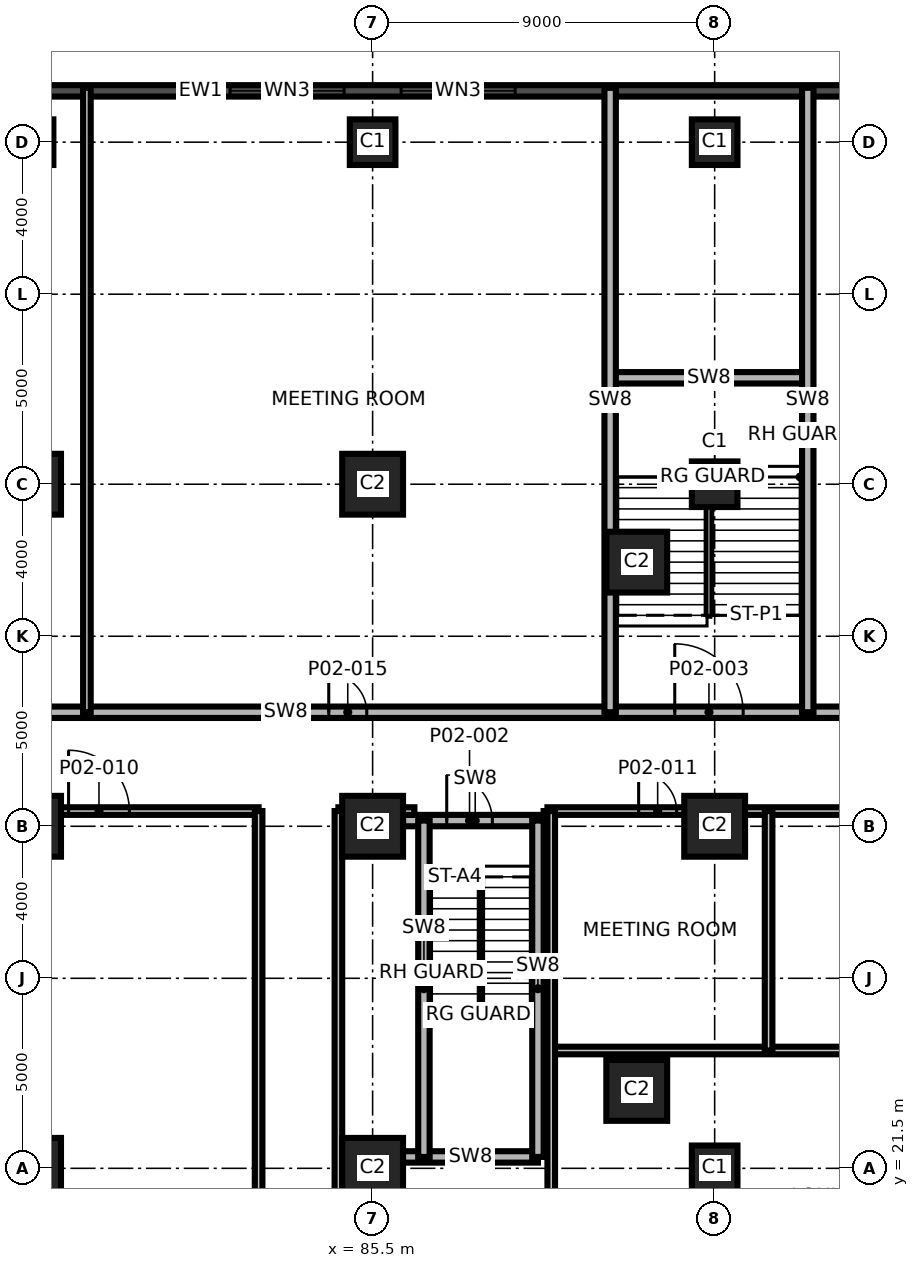
"""IFC4 building model, lengths in metres.
Left out: names, types, materials, properties, quantities, classifications, styles, units other than length and angle.
Written with IfcOpenShell. Run it as: python <this file> out.ifc"""

import sys

from ifc_helpers import new_model, si_unit, direction, frame, frame_2d, origin, origin_2d, place, context, subcontext, project, spatial, rectangle, extrude, element, fill, save


model = new_model("IFC4")
c1 = context("Model", 3, precision=1e-05, world=origin(), true_north=direction((0.0, 1.0)))
c2 = subcontext(c1, "Body", "Model", "MODEL_VIEW")
j1 = project(units=[si_unit("LENGTHUNIT", "METRE"), si_unit("PLANEANGLEUNIT", "RADIAN")], contexts=[c1])
p1 = place(None, origin())
s1 = spatial("IfcSite", under=j1, at=p1, CompositionType="ELEMENT")
p2 = place(p1, origin())
s2 = spatial("IfcBuilding", under=s1, at=p2, CompositionType="ELEMENT")
p3 = place(p2, frame((0.0, 0.0, 13.5)))
s3 = spatial("IfcBuildingStorey", under=s2, at=p3, CompositionType="ELEMENT", Elevation=13.5)
for number, where, z_axis, x_axis in (
    (1, (76.5, 21.5, 0.0), (0.0, 0.0, 1.0), (1.0, 0.0, 0.0)),
    (2, (85.5, 21.5, 0.0), (0.0, 0.0, 1.0), (1.0, 0.0, 0.0)),
):
    element("IfcColumn", number, at=place(p3, frame(where, z_axis=z_axis, x_axis=x_axis)), inside=s3, PredefinedType="COLUMN", context=c2, shape_type="SweptSolid", body=[
        extrude(rectangle(XDim=1.6, YDim=1.6, at=origin_2d()), origin(), (0.0, 0.0, 1.0), 5.0),
    ])
p4 = place(p3, frame((94.5, 21.5, 0.0), z_axis=(0.0, 0.0, 1.0), x_axis=(1.0, 0.0, 0.0)))
e3 = element("IfcColumn", 3, at=p4, inside=s3, PredefinedType="COLUMN", context=c2, shape_type="SweptSolid", body=[
    extrude(rectangle(XDim=1.2, YDim=1.2, at=origin_2d()), origin(), (0.0, 0.0, 1.0), 5.0),
])
for number, where, z_axis, x_axis in (
    (4, (76.5, 30.5, 0.0), (0.0, 0.0, 1.0), (1.0, 0.0, 0.0)),
    (5, (85.5, 30.5, 0.0), (0.0, 0.0, 1.0), (1.0, 0.0, 0.0)),
    (6, (94.5, 30.5, 0.0), (0.0, 0.0, 1.0), (1.0, 0.0, 0.0)),
    (7, (76.5, 39.5, 0.0), (0.0, 0.0, 1.0), (1.0, 0.0, 0.0)),
    (8, (85.5, 39.5, 0.0), (0.0, 0.0, 1.0), (1.0, 0.0, 0.0)),
):
    element("IfcColumn", number, at=place(p3, frame(where, z_axis=z_axis, x_axis=x_axis)), inside=s3, PredefinedType="COLUMN", context=c2, shape_type="SweptSolid", body=[
        extrude(rectangle(XDim=1.6, YDim=1.6, at=origin_2d()), origin(), (0.0, 0.0, 1.0), 5.0),
    ])
for number, where, z_axis, x_axis in (
    (9, (94.5, 39.5, 0.0), (0.0, 0.0, 1.0), (1.0, 0.0, 0.0)),
    (10, (76.5, 48.5, 0.0), (0.0, 0.0, 1.0), (1.0, 0.0, 0.0)),
    (11, (85.5, 48.5, 0.0), (0.0, 0.0, 1.0), (1.0, 0.0, 0.0)),
    (12, (94.5, 48.5, 0.0), (0.0, 0.0, 1.0), (1.0, 0.0, 0.0)),
):
    element("IfcColumn", number, at=place(p3, frame(where, z_axis=z_axis, x_axis=x_axis)), inside=s3, PredefinedType="COLUMN", context=c2, shape_type="SweptSolid", body=[
        extrude(rectangle(XDim=1.2, YDim=1.2, at=origin_2d()), origin(), (0.0, 0.0, 1.0), 5.0),
    ])
for number, where, z_axis, x_axis in (
    (13, (92.45, 23.55, 0.0), (0.0, 0.0, 1.0), (1.0, 0.0, 0.0)),
    (14, (92.45, 37.45, 0.0), (0.0, 0.0, 1.0), (1.0, 0.0, 0.0)),
):
    element("IfcColumn", number, at=place(p3, frame(where, z_axis=z_axis, x_axis=x_axis)), inside=s3, PredefinedType="COLUMN", context=c2, shape_type="SweptSolid", body=[
        extrude(rectangle(XDim=1.6, YDim=1.6, at=origin_2d()), origin(), (0.0, 0.0, 1.0), 5.0),
    ])
p5 = place(p3, frame((98.952, 49.85, 0.0), z_axis=(0.0, 0.0, 1.0), x_axis=(-1.0, 0.0, 0.0)))
e15 = element("IfcWall", 15, at=p5, inside=s3, PredefinedType="SOLIDWALL", context=c2, shape_type="SweptSolid", body=[
    extrude(rectangle(XDim=35.952, YDim=0.3, at=frame_2d((17.976, 0.0))), origin(), (0.0, 0.0, 1.0), 4.7),
])
p6 = place(p5, frame((9.702, 0.0, 0.9)))
e16 = element("IfcOpeningElement", 16, at=p6, cuts=e15, PredefinedType="OPENING", context=c2, shape_type="SweptSolid", body=[
    extrude(rectangle(XDim=3.0, YDim=2.4, at=frame_2d((1.5, 1.2))), frame((0.0, 0.16, 0.0), z_axis=(0.0, -1.0, 0.0), x_axis=(1.0, 0.0, 0.0)), (0.0, 0.0, 1.0), 0.32),
])
p7 = place(p5, frame((14.202, 0.0, 0.9)))
e17 = element("IfcOpeningElement", 17, at=p7, cuts=e15, PredefinedType="OPENING", context=c2, shape_type="SweptSolid", body=[
    extrude(rectangle(XDim=3.0, YDim=2.4, at=frame_2d((1.5, 1.2))), frame((0.0, 0.16, 0.0), z_axis=(0.0, -1.0, 0.0), x_axis=(1.0, 0.0, 0.0)), (0.0, 0.0, 1.0), 0.32),
])
p8 = place(p5, frame((23.202, 0.0, 0.9)))
e18 = element("IfcOpeningElement", 18, at=p8, cuts=e15, PredefinedType="OPENING", context=c2, shape_type="SweptSolid", body=[
    extrude(rectangle(XDim=3.0, YDim=2.4, at=frame_2d((1.5, 1.2))), frame((0.0, 0.16, 0.0), z_axis=(0.0, -1.0, 0.0), x_axis=(1.0, 0.0, 0.0)), (0.0, 0.0, 1.0), 0.32),
])
p9 = place(p5, frame((27.702, 0.0, 0.9)))
e19 = element("IfcOpeningElement", 19, at=p9, cuts=e15, PredefinedType="OPENING", context=c2, shape_type="SweptSolid", body=[
    extrude(rectangle(XDim=3.0, YDim=2.4, at=frame_2d((1.5, 1.2))), frame((0.0, 0.16, 0.0), z_axis=(0.0, -1.0, 0.0), x_axis=(1.0, 0.0, 0.0)), (0.0, 0.0, 1.0), 0.32),
])
p10 = place(p5, frame((32.226, 0.0, 0.9)))
e20 = element("IfcOpeningElement", 20, at=p10, cuts=e15, PredefinedType="OPENING", context=c2, shape_type="SweptSolid", body=[
    extrude(rectangle(XDim=3.0, YDim=2.4, at=frame_2d((1.5, 1.2))), frame((0.0, 0.16, 0.0), z_axis=(0.0, -1.0, 0.0), x_axis=(1.0, 0.0, 0.0)), (0.0, 0.0, 1.0), 0.32),
])
p11 = place(p3, frame((86.3, 21.8, 0.0), z_axis=(0.0, 0.0, 1.0), x_axis=(1.0, 0.0, 0.0)))
e21 = element("IfcWall", 21, at=p11, inside=s3, PredefinedType="SHEAR", context=c2, shape_type="SweptSolid", body=[
    extrude(rectangle(XDim=3.55, YDim=0.3, at=frame_2d((1.775, 0.0))), origin(), (0.0, 0.0, 1.0), 4.7),
])
p12 = place(p3, frame((90.2, 24.6, 0.0), z_axis=(0.0, 0.0, 1.0), x_axis=(1.0, 0.0, 0.0)))
e22 = element("IfcWall", 22, at=p12, inside=s3, PredefinedType="PARTITIONING", context=c2, shape_type="SweptSolid", body=[
    extrude(rectangle(XDim=14.73, YDim=0.2, at=frame_2d((7.365, 0.0))), origin(), (0.0, 0.0, 1.0), 4.7),
])
p13 = place(p12, frame((9.727, 0.0, 0.0)))
e23 = element("IfcOpeningElement", 23, at=p13, cuts=e22, PredefinedType="OPENING", context=c2, shape_type="SweptSolid", body=[
    extrude(rectangle(XDim=1.0, YDim=2.1, at=frame_2d((0.5, 1.05))), frame((0.0, 0.11, 0.0), z_axis=(0.0, -1.0, 0.0), x_axis=(1.0, 0.0, 0.0)), (0.0, 0.0, 1.0), 0.22),
])
p14 = place(p3, frame((86.3, 30.65, 0.0), z_axis=(0.0, 0.0, 1.0), x_axis=(1.0, 0.0, 0.0)))
e24 = element("IfcWall", 24, at=p14, inside=s3, PredefinedType="SHEAR", context=c2, shape_type="SweptSolid", body=[
    extrude(rectangle(XDim=3.8, YDim=0.3, at=frame_2d((1.9, 0.0))), origin(), (0.0, 0.0, 1.0), 4.7),
])
p15 = place(p14, frame((1.15, 0.0, 0.0)))
e25 = element("IfcOpeningElement", 25, at=p15, cuts=e24, PredefinedType="OPENING", context=c2, shape_type="SweptSolid", body=[
    extrude(rectangle(XDim=1.2, YDim=2.1, at=frame_2d((0.6, 1.05))), frame((0.0, 0.16, 0.0), z_axis=(0.0, -1.0, 0.0), x_axis=(1.0, 0.0, 0.0)), (0.0, 0.0, 1.0), 0.32),
])
p16 = place(p3, frame((58.97, 30.9, 0.0), z_axis=(0.0, 0.0, 1.0), x_axis=(1.0, 0.0, 0.0)))
e26 = element("IfcWall", 26, at=p16, inside=s3, PredefinedType="PARTITIONING", context=c2, shape_type="SweptSolid", body=[
    extrude(rectangle(XDim=23.53, YDim=0.2, at=frame_2d((11.765, 0.0))), origin(), (0.0, 0.0, 1.0), 4.7),
])
p17 = place(p16, frame((18.53, 0.0, 0.0)))
e27 = element("IfcOpeningElement", 27, at=p17, cuts=e26, PredefinedType="OPENING", context=c2, shape_type="SweptSolid", body=[
    extrude(rectangle(XDim=1.6, YDim=2.1, at=frame_2d((0.8, 1.05))), frame((0.0, 0.11, 0.0), z_axis=(0.0, -1.0, 0.0), x_axis=(1.0, 0.0, 0.0)), (0.0, 0.0, 1.0), 0.22),
])
p18 = place(p3, frame((84.6, 30.9, 0.0), z_axis=(0.0, 0.0, 1.0), x_axis=(1.0, 0.0, 0.0)))
e28 = element("IfcWall", 28, at=p18, inside=s3, PredefinedType="PARTITIONING", context=c2, shape_type="SweptSolid", body=[
    extrude(rectangle(XDim=2.0, YDim=0.2, at=frame_2d((1.0, 0.0))), origin(), (0.0, 0.0, 1.0), 4.7),
])
p19 = place(p3, frame((90.1, 30.9, 0.0), z_axis=(0.0, 0.0, 1.0), x_axis=(1.0, 0.0, 0.0)))
e29 = element("IfcWall", 29, at=p19, inside=s3, PredefinedType="PARTITIONING", context=c2, shape_type="SweptSolid", body=[
    extrude(rectangle(XDim=14.83, YDim=0.2, at=frame_2d((7.415, 0.0))), origin(), (0.0, 0.0, 1.0), 4.7),
])
p20 = place(p19, frame((2.4, 0.0, 0.0)))
e30 = element("IfcOpeningElement", 30, at=p20, cuts=e29, PredefinedType="OPENING", context=c2, shape_type="SweptSolid", body=[
    extrude(rectangle(XDim=1.0, YDim=2.1, at=frame_2d((0.5, 1.05))), frame((0.0, 0.11, 0.0), z_axis=(0.0, -1.0, 0.0), x_axis=(1.0, 0.0, 0.0)), (0.0, 0.0, 1.0), 0.22),
])
p21 = place(p19, frame((8.826, 0.0, 0.0)))
e31 = element("IfcOpeningElement", 31, at=p21, cuts=e29, PredefinedType="OPENING", context=c2, shape_type="SweptSolid", body=[
    extrude(rectangle(XDim=1.0, YDim=2.1, at=frame_2d((0.5, 1.05))), frame((0.0, 0.11, 0.0), z_axis=(0.0, -1.0, 0.0), x_axis=(1.0, 0.0, 0.0)), (0.0, 0.0, 1.0), 0.22),
])
p22 = place(p3, frame((61.5, 33.5, 0.0), z_axis=(0.0, 0.0, 1.0), x_axis=(1.0, 0.0, 0.0)))
e32 = element("IfcWall", 32, at=p22, inside=s3, PredefinedType="SHEAR", context=c2, shape_type="SweptSolid", body=[
    extrude(rectangle(XDim=43.43, YDim=0.3, at=frame_2d((21.715, 0.0))), origin(), (0.0, 0.0, 1.0), 4.7),
])
p23 = place(p22, frame((31.95, 0.0, 0.0)))
e33 = element("IfcOpeningElement", 33, at=p23, cuts=e32, PredefinedType="OPENING", context=c2, shape_type="SweptSolid", body=[
    extrude(rectangle(XDim=1.8, YDim=2.1, at=frame_2d((0.9, 1.05))), frame((0.0, 0.16, 0.0), z_axis=(0.0, -1.0, 0.0), x_axis=(1.0, 0.0, 0.0)), (0.0, 0.0, 1.0), 0.32),
])
p24 = place(p22, frame((2.068, 0.0, 0.0)))
e34 = element("IfcOpeningElement", 34, at=p24, cuts=e32, PredefinedType="OPENING", context=c2, shape_type="SweptSolid", body=[
    extrude(rectangle(XDim=1.0, YDim=2.1, at=frame_2d((0.5, 1.05))), frame((0.0, 0.16, 0.0), z_axis=(0.0, -1.0, 0.0), x_axis=(1.0, 0.0, 0.0)), (0.0, 0.0, 1.0), 0.32),
])
p25 = place(p22, frame((22.846, 0.0, 0.0)))
e35 = element("IfcOpeningElement", 35, at=p25, cuts=e32, PredefinedType="OPENING", context=c2, shape_type="SweptSolid", body=[
    extrude(rectangle(XDim=1.0, YDim=2.1, at=frame_2d((0.5, 1.05))), frame((0.0, 0.16, 0.0), z_axis=(0.0, -1.0, 0.0), x_axis=(1.0, 0.0, 0.0)), (0.0, 0.0, 1.0), 0.32),
])
p26 = place(p22, frame((37.945, 0.0, 0.0)))
e36 = element("IfcOpeningElement", 36, at=p26, cuts=e32, PredefinedType="OPENING", context=c2, shape_type="SweptSolid", body=[
    extrude(rectangle(XDim=1.0, YDim=2.1, at=frame_2d((0.5, 1.05))), frame((0.0, 0.16, 0.0), z_axis=(0.0, -1.0, 0.0), x_axis=(1.0, 0.0, 0.0)), (0.0, 0.0, 1.0), 0.32),
])
p27 = place(p3, frame((91.75, 42.3, 0.0), z_axis=(0.0, 0.0, 1.0), x_axis=(1.0, 0.0, 0.0)))
e37 = element("IfcWall", 37, at=p27, inside=s3, PredefinedType="SHEAR", context=c2, shape_type="SweptSolid", body=[
    extrude(rectangle(XDim=5.2, YDim=0.3, at=frame_2d((2.6, 0.0))), origin(), (0.0, 0.0, 1.0), 4.7),
])
p28 = place(p3, frame((77.982, 33.5, 0.0), z_axis=(0.0, 0.0, 1.0), x_axis=(0.0, 1.0, 0.0)))
e38 = element("IfcWall", 38, at=p28, inside=s3, PredefinedType="PARTITIONING", context=c2, shape_type="SweptSolid", body=[
    extrude(rectangle(XDim=16.43, YDim=0.2, at=frame_2d((8.215, 0.0))), origin(), (0.0, 0.0, 1.0), 4.7),
])
p29 = place(p3, frame((82.5, 11.07, 0.0), z_axis=(0.0, 0.0, 1.0), x_axis=(0.0, 1.0, 0.0)))
e39 = element("IfcWall", 39, at=p29, inside=s3, PredefinedType="PARTITIONING", context=c2, shape_type="SweptSolid", body=[
    extrude(rectangle(XDim=19.83, YDim=0.2, at=frame_2d((9.915, 0.0))), origin(), (0.0, 0.0, 1.0), 4.7),
])
p30 = place(p3, frame((84.6, 17.4, 0.0), z_axis=(0.0, 0.0, 1.0), x_axis=(0.0, 1.0, 0.0)))
e40 = element("IfcWall", 40, at=p30, inside=s3, PredefinedType="PARTITIONING", context=c2, shape_type="SweptSolid", body=[
    extrude(rectangle(XDim=13.5, YDim=0.2, at=frame_2d((6.75, 0.0))), origin(), (0.0, 0.0, 1.0), 4.7),
])
for number, where, z_axis, x_axis in (
    (41, (86.85, 21.8, 0.0), (0.0, 0.0, 1.0), (0.0, 1.0, 0.0)),
    (42, (89.85, 21.8, 0.0), (0.0, 0.0, 1.0), (0.0, 1.0, 0.0)),
):
    element("IfcWall", number, at=place(p3, frame(where, z_axis=z_axis, x_axis=x_axis)), inside=s3, PredefinedType="SHEAR", context=c2, shape_type="SweptSolid", body=[
        extrude(rectangle(XDim=8.85, YDim=0.3, at=frame_2d((4.425, 0.0))), origin(), (0.0, 0.0, 1.0), 4.7),
    ])
p31 = place(p3, frame((90.1, 30.65, 0.0), z_axis=(0.0, 0.0, 1.0), x_axis=(0.0, 1.0, 0.0)))
e43 = element("IfcWall", 43, at=p31, inside=s3, PredefinedType="PARTITIONING", context=c2, shape_type="SweptSolid", body=[
    extrude(rectangle(XDim=0.25, YDim=0.2, at=frame_2d((0.125, 0.0))), origin(), (0.0, 0.0, 1.0), 4.7),
])
p32 = place(p3, frame((90.2, 11.07, 0.0), z_axis=(0.0, 0.0, 1.0), x_axis=(0.0, 1.0, 0.0)))
e44 = element("IfcWall", 44, at=p32, inside=s3, PredefinedType="PARTITIONING", context=c2, shape_type="SweptSolid", body=[
    extrude(rectangle(XDim=19.83, YDim=0.2, at=frame_2d((9.915, 0.0))), origin(), (0.0, 0.0, 1.0), 4.7),
])
p33 = place(p3, frame((91.75, 33.5, 0.0), z_axis=(0.0, 0.0, 1.0), x_axis=(0.0, 1.0, 0.0)))
e45 = element("IfcWall", 45, at=p33, inside=s3, PredefinedType="SHEAR", context=c2, shape_type="SweptSolid", body=[
    extrude(rectangle(XDim=16.43, YDim=0.3, at=frame_2d((8.215, 0.0))), origin(), (0.0, 0.0, 1.0), 4.7),
])
p34 = place(p3, frame((95.919, 24.6, 0.0), z_axis=(0.0, 0.0, 1.0), x_axis=(0.0, 1.0, 0.0)))
e46 = element("IfcWall", 46, at=p34, inside=s3, PredefinedType="PARTITIONING", context=c2, shape_type="SweptSolid", body=[
    extrude(rectangle(XDim=6.3, YDim=0.2, at=frame_2d((3.15, 0.0))), origin(), (0.0, 0.0, 1.0), 4.7),
])
p35 = place(p3, frame((96.95, 33.5, 0.0), z_axis=(0.0, 0.0, 1.0), x_axis=(0.0, 1.0, 0.0)))
e47 = element("IfcWall", 47, at=p35, inside=s3, PredefinedType="SHEAR", context=c2, shape_type="SweptSolid", body=[
    extrude(rectangle(XDim=16.43, YDim=0.3, at=frame_2d((8.215, 0.0))), origin(), (0.0, 0.0, 1.0), 4.7),
])
p36 = place(p6, origin())
e48 = element("IfcWindow", 48, at=p36, inside=s3, PartitioningType="SINGLE_PANEL", PredefinedType="WINDOW", context=c2, shape_type="SweptSolid", body=[
    extrude(rectangle(XDim=3.0, YDim=2.4, at=frame_2d((1.5, 1.2))), frame((0.0, 0.03, 0.0), z_axis=(0.0, -1.0, 0.0), x_axis=(1.0, 0.0, 0.0)), (0.0, 0.0, 1.0), 0.06),
])
fill(e16, e48)
p37 = place(p7, origin())
e49 = element("IfcWindow", 49, at=p37, inside=s3, PartitioningType="SINGLE_PANEL", PredefinedType="WINDOW", context=c2, shape_type="SweptSolid", body=[
    extrude(rectangle(XDim=3.0, YDim=2.4, at=frame_2d((1.5, 1.2))), frame((0.0, 0.03, 0.0), z_axis=(0.0, -1.0, 0.0), x_axis=(1.0, 0.0, 0.0)), (0.0, 0.0, 1.0), 0.06),
])
fill(e17, e49)
p38 = place(p15, origin())
e50 = element("IfcDoor", 50, at=p38, inside=s3, OperationType="SINGLE_SWING_RIGHT", PredefinedType="DOOR", context=c2, shape_type="SweptSolid", body=[
    extrude(rectangle(XDim=1.2, YDim=2.1, at=frame_2d((0.6, 1.05))), frame((0.0, 0.025, 0.0), z_axis=(0.0, -1.0, 0.0), x_axis=(1.0, 0.0, 0.0)), (0.0, 0.0, 1.0), 0.05),
])
fill(e25, e50)
p39 = place(p23, origin())
e51 = element("IfcDoor", 51, at=p39, inside=s3, OperationType="SINGLE_SWING_LEFT", PredefinedType="DOOR", context=c2, shape_type="SweptSolid", body=[
    extrude(rectangle(XDim=1.8, YDim=2.1, at=frame_2d((0.9, 1.05))), frame((0.0, 0.025, 0.0), z_axis=(0.0, -1.0, 0.0), x_axis=(1.0, 0.0, 0.0)), (0.0, 0.0, 1.0), 0.05),
])
fill(e33, e51)
p40 = place(p17, origin())
e52 = element("IfcDoor", 52, at=p40, inside=s3, OperationType="SINGLE_SWING_RIGHT", PredefinedType="DOOR", context=c2, shape_type="SweptSolid", body=[
    extrude(rectangle(XDim=1.6, YDim=2.1, at=frame_2d((0.8, 1.05))), frame((0.0, 0.025, 0.0), z_axis=(0.0, -1.0, 0.0), x_axis=(1.0, 0.0, 0.0)), (0.0, 0.0, 1.0), 0.05),
])
fill(e27, e52)
p41 = place(p20, origin())
e53 = element("IfcDoor", 53, at=p41, inside=s3, OperationType="SINGLE_SWING_LEFT", PredefinedType="DOOR", context=c2, shape_type="SweptSolid", body=[
    extrude(rectangle(XDim=1.0, YDim=2.1, at=frame_2d((0.5, 1.05))), frame((0.0, 0.025, 0.0), z_axis=(0.0, -1.0, 0.0), x_axis=(1.0, 0.0, 0.0)), (0.0, 0.0, 1.0), 0.05),
])
fill(e30, e53)
p42 = place(p25, origin())
e54 = element("IfcDoor", 54, at=p42, inside=s3, OperationType="SINGLE_SWING_LEFT", PredefinedType="DOOR", context=c2, shape_type="SweptSolid", body=[
    extrude(rectangle(XDim=1.0, YDim=2.1, at=frame_2d((0.5, 1.05))), frame((0.0, 0.025, 0.0), z_axis=(0.0, -1.0, 0.0), x_axis=(1.0, 0.0, 0.0)), (0.0, 0.0, 1.0), 0.05),
])
fill(e35, e54)
save(model, sys.argv[1])
